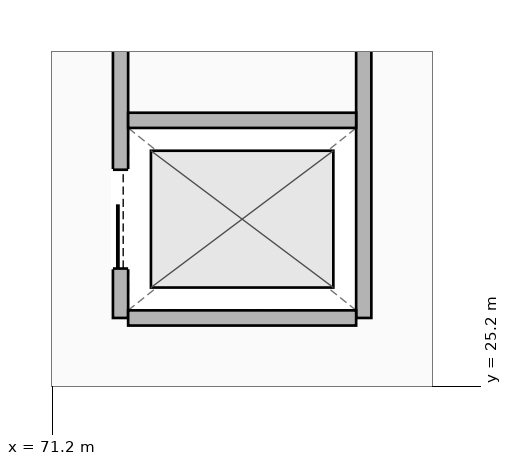
"""IFC4 building model, lengths in metres.
Left out: names, types, materials, properties, quantities, classifications, styles, units other than length and angle.
Written with IfcOpenShell. Run it as: python <this file> out.ifc"""

import sys

from ifc_helpers import new_model, si_unit, direction, frame, frame_2d, origin, place, context, subcontext, project, spatial, rectangle, extrude, element, fill, save


model = new_model("IFC4")
c1 = context("Model", 3, precision=1e-05, world=origin(), true_north=direction((0.0, 1.0)))
c2 = subcontext(c1, "Body", "Model", "MODEL_VIEW")
j1 = project(units=[si_unit("LENGTHUNIT", "METRE"), si_unit("PLANEANGLEUNIT", "RADIAN")], contexts=[c1])
p1 = place(None, origin())
s1 = spatial("IfcSite", under=j1, at=p1, CompositionType="ELEMENT")
p2 = place(p1, origin())
s2 = spatial("IfcBuilding", under=s1, at=p2, CompositionType="ELEMENT")
p3 = place(p2, origin())
s3 = spatial("IfcBuildingStorey", under=s2, at=p3, CompositionType="ELEMENT", Elevation=0.0)
p4 = place(p3, frame((72.1, 26.1, 0.0), z_axis=(0.0, 0.0, 1.0), x_axis=(0.0, 1.0, 0.0)))
e1 = element("IfcWall", 1, at=p4, inside=s3, PredefinedType="SOLIDWALL", context=c2, shape_type="SweptSolid", body=[
    extrude(rectangle(XDim=11.8, YDim=0.2, at=frame_2d((5.9, 0.0))), origin(), (0.0, 0.0, 1.0), 3.31),
])
p5 = place(p4, frame((0.65, 0.0, 0.0)))
e2 = element("IfcOpeningElement", 2, at=p5, cuts=e1, PredefinedType="OPENING", context=c2, shape_type="SweptSolid", body=[
    extrude(rectangle(XDim=1.3, YDim=2.25, at=frame_2d((0.65, 1.125))), frame((0.0, 0.11, 0.0), z_axis=(0.0, -1.0, 0.0), x_axis=(1.0, 0.0, 0.0)), (0.0, 0.0, 1.0), 0.22),
])
p6 = place(p4, frame((9.85, 0.0, 0.0)))
e3 = element("IfcOpeningElement", 3, at=p6, cuts=e1, PredefinedType="OPENING", context=c2, shape_type="SweptSolid", body=[
    extrude(rectangle(XDim=1.3, YDim=2.25, at=frame_2d((0.65, 1.125))), frame((0.0, 0.11, 0.0), z_axis=(0.0, -1.0, 0.0), x_axis=(1.0, 0.0, 0.0)), (0.0, 0.0, 1.0), 0.22),
])
p7 = place(p3, frame((75.3, 26.1, 0.0), z_axis=(0.0, 0.0, 1.0), x_axis=(0.0, 1.0, 0.0)))
e4 = element("IfcWall", 4, at=p7, inside=s3, PredefinedType="SOLIDWALL", context=c2, shape_type="SweptSolid", body=[
    extrude(rectangle(XDim=11.8, YDim=0.2, at=frame_2d((5.9, 0.0))), origin(), (0.0, 0.0, 1.0), 3.31),
])
for number, where, z_axis, x_axis in (
    (5, (72.2, 26.1, 0.0), (0.0, 0.0, 1.0), (1.0, 0.0, 0.0)),
    (6, (72.2, 28.7, 0.0), (0.0, 0.0, 1.0), (1.0, 0.0, 0.0)),
):
    element("IfcWall", number, at=place(p3, frame(where, z_axis=z_axis, x_axis=x_axis)), inside=s3, PredefinedType="SOLIDWALL", context=c2, shape_type="SweptSolid", body=[
        extrude(rectangle(XDim=3.0, YDim=0.2, at=frame_2d((1.5, 0.0))), origin(), (0.0, 0.0, 1.0), 3.31),
    ])
p8 = place(p5, origin())
e7 = element("IfcDoor", 7, at=p8, inside=s3, OperationType="SLIDING_TO_LEFT", PredefinedType="DOOR", context=c2, shape_type="SweptSolid", body=[
    extrude(rectangle(XDim=1.3, YDim=2.25, at=frame_2d((0.65, 1.125))), frame((0.0, 0.025, 0.0), z_axis=(0.0, -1.0, 0.0), x_axis=(1.0, 0.0, 0.0)), (0.0, 0.0, 1.0), 0.05),
])
fill(e2, e7)
save(model, sys.argv[1])
